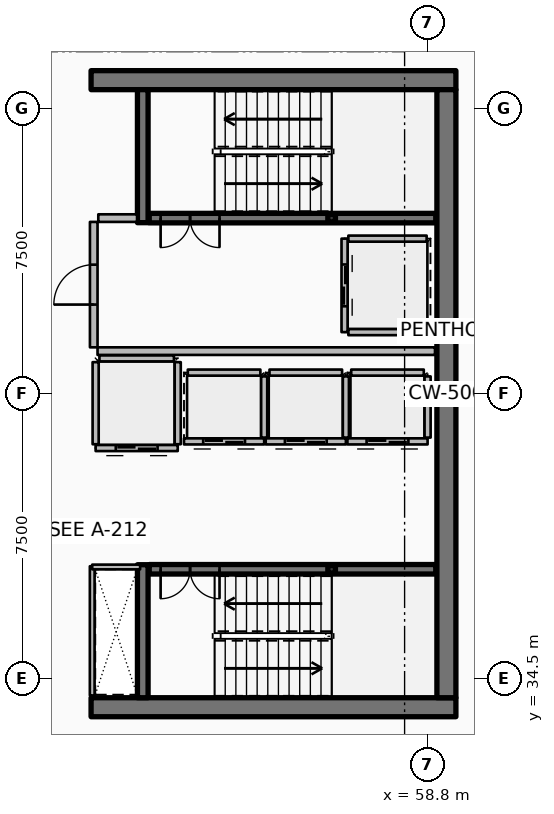
"""IFC4 building model, lengths in metres.
Left out: names, types, materials, properties, quantities, classifications, styles, units other than length and angle.
Written with IfcOpenShell. Run it as: python <this file> out.ifc"""

import sys

from ifc_helpers import new_model, si_unit, direction, frame, frame_2d, origin, origin_2d, place, context, subcontext, project, spatial, rectangle, hollow_rectangle, extrude, element, fill, save


model = new_model("IFC4")
c1 = context("Model", 3, precision=1e-05, world=origin(), true_north=direction((0.0, 1.0)))
c2 = subcontext(c1, "Body", "Model", "MODEL_VIEW")
j1 = project(units=[si_unit("LENGTHUNIT", "METRE"), si_unit("PLANEANGLEUNIT", "RADIAN")], contexts=[c1])
p1 = place(None, origin())
s1 = spatial("IfcSite", under=j1, at=p1, CompositionType="ELEMENT")
p2 = place(p1, origin())
s2 = spatial("IfcBuilding", under=s1, at=p2, CompositionType="ELEMENT")
p3 = place(p2, frame((0.0, 0.0, 322.1)))
s3 = spatial("IfcBuildingStorey", under=s2, at=p3, CompositionType="ELEMENT", Elevation=322.1)
for number, where, z_axis, x_axis in (
    (1, (49.95, 33.75, 0.0), (0.0, 0.0, 1.0), (1.0, 0.0, 0.0)),
    (2, (49.95, 50.25, 0.0), (0.0, 0.0, 1.0), (1.0, 0.0, 0.0)),
):
    element("IfcWall", number, at=place(p3, frame(where, z_axis=z_axis, x_axis=x_axis)), inside=s3, PredefinedType="SHEAR", context=c2, shape_type="SweptSolid", body=[
        extrude(rectangle(XDim=9.6, YDim=0.5, at=frame_2d((4.8, 0.0))), origin(), (0.0, 0.0, 1.0), 4.2),
    ])
p4 = place(p3, frame((59.3, 34.0, 0.0), z_axis=(0.0, 0.0, 1.0), x_axis=(0.0, 1.0, 0.0)))
e3 = element("IfcWall", 3, at=p4, inside=s3, PredefinedType="SHEAR", context=c2, shape_type="SweptSolid", body=[
    extrude(rectangle(XDim=16.0, YDim=0.5, at=frame_2d((8.0, 0.0))), origin(), (0.0, 0.0, 1.0), 4.2),
])
for number, where, z_axis, x_axis in (
    (4, (51.31, 46.5, 0.0), (0.0, 0.0, 1.0), (0.0, 1.0, 0.0)),
    (5, (51.31, 34.0, 0.0), (0.0, 0.0, 1.0), (0.0, 1.0, 0.0)),
):
    element("IfcWall", number, at=place(p3, frame(where, z_axis=z_axis, x_axis=x_axis)), inside=s3, PredefinedType="SHEAR", context=c2, shape_type="SweptSolid", body=[
        extrude(rectangle(XDim=3.5, YDim=0.28, at=frame_2d((1.75, 0.0))), origin(), (0.0, 0.0, 1.0), 4.2),
    ])
for number, where, z_axis, x_axis in (
    (6, (56.28, 46.62, 0.0), (0.0, 0.0, 1.0), (1.0, 0.0, 0.0)),
    (7, (56.28, 37.38, 0.0), (0.0, 0.0, 1.0), (1.0, 0.0, 0.0)),
):
    element("IfcColumn", number, at=place(p3, frame(where, z_axis=z_axis, x_axis=x_axis)), inside=s3, PredefinedType="COLUMN", context=c2, shape_type="SweptSolid", body=[
        extrude(hollow_rectangle(XDim=0.2, YDim=0.2, WallThickness=0.01, InnerFilletRadius=0.01, OuterFilletRadius=0.02, at=origin_2d()), origin(), (0.0, 0.0, 1.0), 1.895),
    ])
p5 = place(p3, frame((51.48, 46.62, 0.0), z_axis=(0.0, 0.0, 1.0), x_axis=(1.0, 0.0, 0.0)))
e8 = element("IfcWall", 8, at=p5, inside=s3, PredefinedType="SOLIDWALL", context=c2, shape_type="SweptSolid", body=[
    extrude(rectangle(XDim=7.54, YDim=0.25, at=frame_2d((3.77, 0.0))), origin(), (0.0, 0.0, 1.0), 3.94),
])
p6 = place(p5, frame((0.3, 0.0, 0.0)))
e9 = element("IfcOpeningElement", 9, at=p6, cuts=e8, PredefinedType="OPENING", context=c2, shape_type="SweptSolid", body=[
    extrude(rectangle(XDim=1.55, YDim=2.15, at=frame_2d((0.775, 1.075))), frame((0.0, 0.135, 0.0), z_axis=(0.0, -1.0, 0.0), x_axis=(1.0, 0.0, 0.0)), (0.0, 0.0, 1.0), 0.27),
])
p7 = place(p3, frame((51.48, 37.38, 0.0), z_axis=(0.0, 0.0, 1.0), x_axis=(1.0, 0.0, 0.0)))
e10 = element("IfcWall", 10, at=p7, inside=s3, PredefinedType="SOLIDWALL", context=c2, shape_type="SweptSolid", body=[
    extrude(rectangle(XDim=7.54, YDim=0.25, at=frame_2d((3.77, 0.0))), origin(), (0.0, 0.0, 1.0), 3.94),
])
p8 = place(p7, frame((0.3, 0.0, 0.0)))
e11 = element("IfcOpeningElement", 11, at=p8, cuts=e10, PredefinedType="OPENING", context=c2, shape_type="SweptSolid", body=[
    extrude(rectangle(XDim=1.55, YDim=2.15, at=frame_2d((0.775, 1.075))), frame((0.0, 0.135, 0.0), z_axis=(0.0, -1.0, 0.0), x_axis=(1.0, 0.0, 0.0)), (0.0, 0.0, 1.0), 0.27),
])
p9 = place(p3, frame((54.505, 40.745, 0.0), z_axis=(0.0, 0.0, 1.0), x_axis=(-1.0, 0.0, 0.0)))
e12 = element("IfcWall", 12, at=p9, inside=s3, PredefinedType="PARTITIONING", context=c2, shape_type="SweptSolid", body=[
    extrude(rectangle(XDim=2.11, YDim=0.16, at=frame_2d((1.055, 0.0))), origin(), (0.0, 0.0, 1.0), 3.94),
])
p10 = place(p9, frame((0.505, 0.0, 0.0)))
e13 = element("IfcOpeningElement", 13, at=p10, cuts=e12, PredefinedType="OPENING", context=c2, shape_type="SweptSolid", body=[
    extrude(rectangle(XDim=1.1, YDim=2.1, at=frame_2d((0.55, 1.05))), frame((0.0, 0.09, 0.0), z_axis=(0.0, -1.0, 0.0), x_axis=(1.0, 0.0, 0.0)), (0.0, 0.0, 1.0), 0.18),
])
p11 = place(p3, frame((54.505, 40.845, 0.0), z_axis=(0.0, 0.0, 1.0), x_axis=(0.0, 1.0, 0.0)))
e14 = element("IfcWall", 14, at=p11, inside=s3, PredefinedType="PARTITIONING", context=c2, shape_type="SweptSolid", body=[
    extrude(rectangle(XDim=1.61, YDim=0.16, at=frame_2d((0.805, 0.0))), origin(), (0.0, 0.0, 1.0), 3.94),
])
p12 = place(p3, frame((52.495, 42.555, 0.0), z_axis=(0.0, 0.0, 1.0), x_axis=(1.0, 0.0, 0.0)))
e15 = element("IfcWall", 15, at=p12, inside=s3, PredefinedType="PARTITIONING", context=c2, shape_type="SweptSolid", body=[
    extrude(rectangle(XDim=1.91, YDim=0.16, at=frame_2d((0.955, 0.0))), origin(), (0.0, 0.0, 1.0), 3.94),
])
p13 = place(p3, frame((56.655, 40.745, 0.0), z_axis=(0.0, 0.0, 1.0), x_axis=(-1.0, 0.0, 0.0)))
e16 = element("IfcWall", 16, at=p13, inside=s3, PredefinedType="PARTITIONING", context=c2, shape_type="SweptSolid", body=[
    extrude(rectangle(XDim=2.11, YDim=0.16, at=frame_2d((1.055, 0.0))), origin(), (0.0, 0.0, 1.0), 3.94),
])
p14 = place(p13, frame((0.505, 0.0, 0.0)))
e17 = element("IfcOpeningElement", 17, at=p14, cuts=e16, PredefinedType="OPENING", context=c2, shape_type="SweptSolid", body=[
    extrude(rectangle(XDim=1.1, YDim=2.1, at=frame_2d((0.55, 1.05))), frame((0.0, 0.09, 0.0), z_axis=(0.0, -1.0, 0.0), x_axis=(1.0, 0.0, 0.0)), (0.0, 0.0, 1.0), 0.18),
])
p15 = place(p3, frame((56.655, 40.845, 0.0), z_axis=(0.0, 0.0, 1.0), x_axis=(0.0, 1.0, 0.0)))
e18 = element("IfcWall", 18, at=p15, inside=s3, PredefinedType="PARTITIONING", context=c2, shape_type="SweptSolid", body=[
    extrude(rectangle(XDim=1.61, YDim=0.16, at=frame_2d((0.805, 0.0))), origin(), (0.0, 0.0, 1.0), 3.94),
])
p16 = place(p3, frame((54.645, 42.555, 0.0), z_axis=(0.0, 0.0, 1.0), x_axis=(1.0, 0.0, 0.0)))
e19 = element("IfcWall", 19, at=p16, inside=s3, PredefinedType="PARTITIONING", context=c2, shape_type="SweptSolid", body=[
    extrude(rectangle(XDim=1.91, YDim=0.16, at=frame_2d((0.955, 0.0))), origin(), (0.0, 0.0, 1.0), 3.94),
])
p17 = place(p3, frame((58.805, 40.745, 0.0), z_axis=(0.0, 0.0, 1.0), x_axis=(-1.0, 0.0, 0.0)))
e20 = element("IfcWall", 20, at=p17, inside=s3, PredefinedType="PARTITIONING", context=c2, shape_type="SweptSolid", body=[
    extrude(rectangle(XDim=2.11, YDim=0.16, at=frame_2d((1.055, 0.0))), origin(), (0.0, 0.0, 1.0), 3.94),
])
p18 = place(p17, frame((0.505, 0.0, 0.0)))
e21 = element("IfcOpeningElement", 21, at=p18, cuts=e20, PredefinedType="OPENING", context=c2, shape_type="SweptSolid", body=[
    extrude(rectangle(XDim=1.1, YDim=2.1, at=frame_2d((0.55, 1.05))), frame((0.0, 0.09, 0.0), z_axis=(0.0, -1.0, 0.0), x_axis=(1.0, 0.0, 0.0)), (0.0, 0.0, 1.0), 0.18),
])
p19 = place(p3, frame((58.805, 40.845, 0.0), z_axis=(0.0, 0.0, 1.0), x_axis=(0.0, 1.0, 0.0)))
e22 = element("IfcWall", 22, at=p19, inside=s3, PredefinedType="PARTITIONING", context=c2, shape_type="SweptSolid", body=[
    extrude(rectangle(XDim=1.61, YDim=0.16, at=frame_2d((0.805, 0.0))), origin(), (0.0, 0.0, 1.0), 3.94),
])
p20 = place(p3, frame((56.795, 42.555, 0.0), z_axis=(0.0, 0.0, 1.0), x_axis=(1.0, 0.0, 0.0)))
e23 = element("IfcWall", 23, at=p20, inside=s3, PredefinedType="PARTITIONING", context=c2, shape_type="SweptSolid", body=[
    extrude(rectangle(XDim=1.91, YDim=0.16, at=frame_2d((0.955, 0.0))), origin(), (0.0, 0.0, 1.0), 3.94),
])
p21 = place(p3, frame((56.62, 46.08, 0.0), z_axis=(0.0, 0.0, 1.0), x_axis=(0.0, -1.0, 0.0)))
e24 = element("IfcWall", 24, at=p21, inside=s3, PredefinedType="PARTITIONING", context=c2, shape_type="SweptSolid", body=[
    extrude(rectangle(XDim=2.46, YDim=0.16, at=frame_2d((1.23, 0.0))), origin(), (0.0, 0.0, 1.0), 3.94),
])
p22 = place(p21, frame((0.68, 0.0, 0.0)))
e25 = element("IfcOpeningElement", 25, at=p22, cuts=e24, PredefinedType="OPENING", context=c2, shape_type="SweptSolid", body=[
    extrude(rectangle(XDim=1.1, YDim=2.1, at=frame_2d((0.55, 1.05))), frame((0.0, 0.09, 0.0), z_axis=(0.0, -1.0, 0.0), x_axis=(1.0, 0.0, 0.0)), (0.0, 0.0, 1.0), 0.18),
])
for number, where, z_axis, x_axis in (
    (26, (56.72, 46.08, 0.0), (0.0, 0.0, 1.0), (1.0, 0.0, 0.0)),
    (27, (56.72, 43.62, 0.0), (0.0, 0.0, 1.0), (1.0, 0.0, 0.0)),
):
    element("IfcWall", number, at=place(p3, frame(where, z_axis=z_axis, x_axis=x_axis)), inside=s3, PredefinedType="PARTITIONING", context=c2, shape_type="SweptSolid", body=[
        extrude(rectangle(XDim=2.06, YDim=0.16, at=frame_2d((1.03, 0.0))), origin(), (0.0, 0.0, 1.0), 3.94),
    ])
p23 = place(p3, frame((52.23, 40.57, 0.0), z_axis=(0.0, 0.0, 1.0), x_axis=(-1.0, 0.0, 0.0)))
e28 = element("IfcWall", 28, at=p23, inside=s3, PredefinedType="PARTITIONING", context=c2, shape_type="SweptSolid", body=[
    extrude(rectangle(XDim=2.16, YDim=0.16, at=frame_2d((1.08, 0.0))), origin(), (0.0, 0.0, 1.0), 3.94),
])
p24 = place(p23, frame((0.53, 0.0, 0.0)))
e29 = element("IfcOpeningElement", 29, at=p24, cuts=e28, PredefinedType="OPENING", context=c2, shape_type="SweptSolid", body=[
    extrude(rectangle(XDim=1.1, YDim=2.1, at=frame_2d((0.55, 1.05))), frame((0.0, 0.09, 0.0), z_axis=(0.0, -1.0, 0.0), x_axis=(1.0, 0.0, 0.0)), (0.0, 0.0, 1.0), 0.18),
])
for number, where, z_axis, x_axis in (
    (30, (52.23, 40.67, 0.0), (0.0, 0.0, 1.0), (0.0, 1.0, 0.0)),
    (31, (50.07, 40.67, 0.0), (0.0, 0.0, 1.0), (0.0, 1.0, 0.0)),
):
    element("IfcWall", number, at=place(p3, frame(where, z_axis=z_axis, x_axis=x_axis)), inside=s3, PredefinedType="PARTITIONING", context=c2, shape_type="SweptSolid", body=[
        extrude(rectangle(XDim=2.16, YDim=0.16, at=frame_2d((1.08, 0.0))), origin(), (0.0, 0.0, 1.0), 3.94),
    ])
p25 = place(p3, frame((50.17, 42.93, 0.0), z_axis=(0.0, 0.0, 1.0), x_axis=(1.0, 0.0, 0.0)))
e32 = element("IfcWall", 32, at=p25, inside=s3, PredefinedType="PARTITIONING", context=c2, shape_type="SweptSolid", body=[
    extrude(rectangle(XDim=1.96, YDim=0.16, at=frame_2d((0.98, 0.0))), origin(), (0.0, 0.0, 1.0), 3.94),
])
p26 = place(p3, frame((50.12, 43.12, 0.0), z_axis=(0.0, 0.0, 1.0), x_axis=(1.0, 0.0, 0.0)))
e33 = element("IfcWall", 33, at=p26, inside=s3, PredefinedType="PARTITIONING", context=c2, shape_type="SweptSolid", body=[
    extrude(rectangle(XDim=8.88, YDim=0.2, at=frame_2d((4.44, 0.0))), origin(), (0.0, 0.0, 1.0), 3.94),
])
p27 = place(p3, frame((50.14, 46.62, 0.0), z_axis=(0.0, 0.0, 1.0), x_axis=(1.0, 0.0, 0.0)))
e34 = element("IfcWall", 34, at=p27, inside=s3, PredefinedType="PARTITIONING", context=c2, shape_type="SweptSolid", body=[
    extrude(rectangle(XDim=1.02, YDim=0.2, at=frame_2d((0.51, 0.0))), origin(), (0.0, 0.0, 1.0), 3.94),
])
p28 = place(p3, frame((50.02, 43.22, 0.0), z_axis=(0.0, 0.0, 1.0), x_axis=(0.0, 1.0, 0.0)))
e35 = element("IfcWall", 35, at=p28, inside=s3, PredefinedType="PARTITIONING", context=c2, shape_type="SweptSolid", body=[
    extrude(rectangle(XDim=3.3, YDim=0.2, at=frame_2d((1.65, 0.0))), origin(), (0.0, 0.0, 1.0), 3.94),
])
p29 = place(p28, frame((1.125, 0.0, 0.0)))
e36 = element("IfcOpeningElement", 36, at=p29, cuts=e35, PredefinedType="OPENING", context=c2, shape_type="SweptSolid", body=[
    extrude(rectangle(XDim=1.05, YDim=2.1, at=frame_2d((0.525, 1.05))), frame((0.0, 0.11, 0.0), z_axis=(0.0, -1.0, 0.0), x_axis=(1.0, 0.0, 0.0)), (0.0, 0.0, 1.0), 0.22),
])
p30 = place(p3, frame((49.98, 34.06, 0.0), z_axis=(0.0, 0.0, 1.0), x_axis=(0.0, 1.0, 0.0)))
e37 = element("IfcWall", 37, at=p30, inside=s3, PredefinedType="PARTITIONING", context=c2, shape_type="SweptSolid", body=[
    extrude(rectangle(XDim=3.4, YDim=0.125, at=frame_2d((1.7, 0.0))), origin(), (0.0, 0.0, 1.0), 3.38),
])
p31 = place(p3, frame((49.98, 37.44, 0.0), z_axis=(0.0, 0.0, 1.0), x_axis=(1.0, 0.0, 0.0)))
e38 = element("IfcWall", 38, at=p31, inside=s3, PredefinedType="PARTITIONING", context=c2, shape_type="SweptSolid", body=[
    extrude(rectangle(XDim=1.26, YDim=0.125, at=frame_2d((0.63, 0.0))), origin(), (0.0, 0.0, 1.0), 3.38),
])
p32 = place(p6, origin())
e39 = element("IfcDoor", 39, at=p32, inside=s3, OperationType="DOUBLE_DOOR_SINGLE_SWING", PredefinedType="DOOR", context=c2, shape_type="SweptSolid", body=[
    extrude(rectangle(XDim=1.55, YDim=2.15, at=frame_2d((0.775, 1.075))), frame((0.0, 0.025, 0.0), z_axis=(0.0, -1.0, 0.0), x_axis=(1.0, 0.0, 0.0)), (0.0, 0.0, 1.0), 0.05),
])
fill(e9, e39)
p33 = place(p8, origin())
e40 = element("IfcDoor", 40, at=p33, inside=s3, OperationType="DOUBLE_DOOR_SINGLE_SWING", PredefinedType="DOOR", context=c2, shape_type="SweptSolid", body=[
    extrude(rectangle(XDim=1.55, YDim=2.15, at=frame_2d((0.775, 1.075))), frame((0.0, 0.025, 0.0), z_axis=(0.0, -1.0, 0.0), x_axis=(1.0, 0.0, 0.0)), (0.0, 0.0, 1.0), 0.05),
])
fill(e11, e40)
p34 = place(p10, origin())
e41 = element("IfcDoor", 41, at=p34, inside=s3, OperationType="DOUBLE_DOOR_SLIDING", PredefinedType="DOOR", context=c2, shape_type="SweptSolid", body=[
    extrude(rectangle(XDim=1.1, YDim=2.1, at=frame_2d((0.55, 1.05))), frame((0.0, 0.025, 0.0), z_axis=(0.0, -1.0, 0.0), x_axis=(1.0, 0.0, 0.0)), (0.0, 0.0, 1.0), 0.05),
])
fill(e13, e41)
p35 = place(p14, origin())
e42 = element("IfcDoor", 42, at=p35, inside=s3, OperationType="DOUBLE_DOOR_SLIDING", PredefinedType="DOOR", context=c2, shape_type="SweptSolid", body=[
    extrude(rectangle(XDim=1.1, YDim=2.1, at=frame_2d((0.55, 1.05))), frame((0.0, 0.025, 0.0), z_axis=(0.0, -1.0, 0.0), x_axis=(1.0, 0.0, 0.0)), (0.0, 0.0, 1.0), 0.05),
])
fill(e17, e42)
p36 = place(p18, origin())
e43 = element("IfcDoor", 43, at=p36, inside=s3, OperationType="DOUBLE_DOOR_SLIDING", PredefinedType="DOOR", context=c2, shape_type="SweptSolid", body=[
    extrude(rectangle(XDim=1.1, YDim=2.1, at=frame_2d((0.55, 1.05))), frame((0.0, 0.025, 0.0), z_axis=(0.0, -1.0, 0.0), x_axis=(1.0, 0.0, 0.0)), (0.0, 0.0, 1.0), 0.05),
])
fill(e21, e43)
p37 = place(p22, origin())
e44 = element("IfcDoor", 44, at=p37, inside=s3, OperationType="DOUBLE_DOOR_SLIDING", PredefinedType="DOOR", context=c2, shape_type="SweptSolid", body=[
    extrude(rectangle(XDim=1.1, YDim=2.1, at=frame_2d((0.55, 1.05))), frame((0.0, 0.025, 0.0), z_axis=(0.0, -1.0, 0.0), x_axis=(1.0, 0.0, 0.0)), (0.0, 0.0, 1.0), 0.05),
])
fill(e25, e44)
p38 = place(p24, origin())
e45 = element("IfcDoor", 45, at=p38, inside=s3, OperationType="DOUBLE_DOOR_SLIDING", PredefinedType="DOOR", context=c2, shape_type="SweptSolid", body=[
    extrude(rectangle(XDim=1.1, YDim=2.1, at=frame_2d((0.55, 1.05))), frame((0.0, 0.025, 0.0), z_axis=(0.0, -1.0, 0.0), x_axis=(1.0, 0.0, 0.0)), (0.0, 0.0, 1.0), 0.05),
])
fill(e29, e45)
p39 = place(p29, origin())
e46 = element("IfcDoor", 46, at=p39, inside=s3, OperationType="SINGLE_SWING_LEFT", PredefinedType="DOOR", context=c2, shape_type="SweptSolid", body=[
    extrude(rectangle(XDim=1.05, YDim=2.1, at=frame_2d((0.525, 1.05))), frame((0.0, 0.025, 0.0), z_axis=(0.0, -1.0, 0.0), x_axis=(1.0, 0.0, 0.0)), (0.0, 0.0, 1.0), 0.05),
])
fill(e36, e46)
save(model, sys.argv[1])
